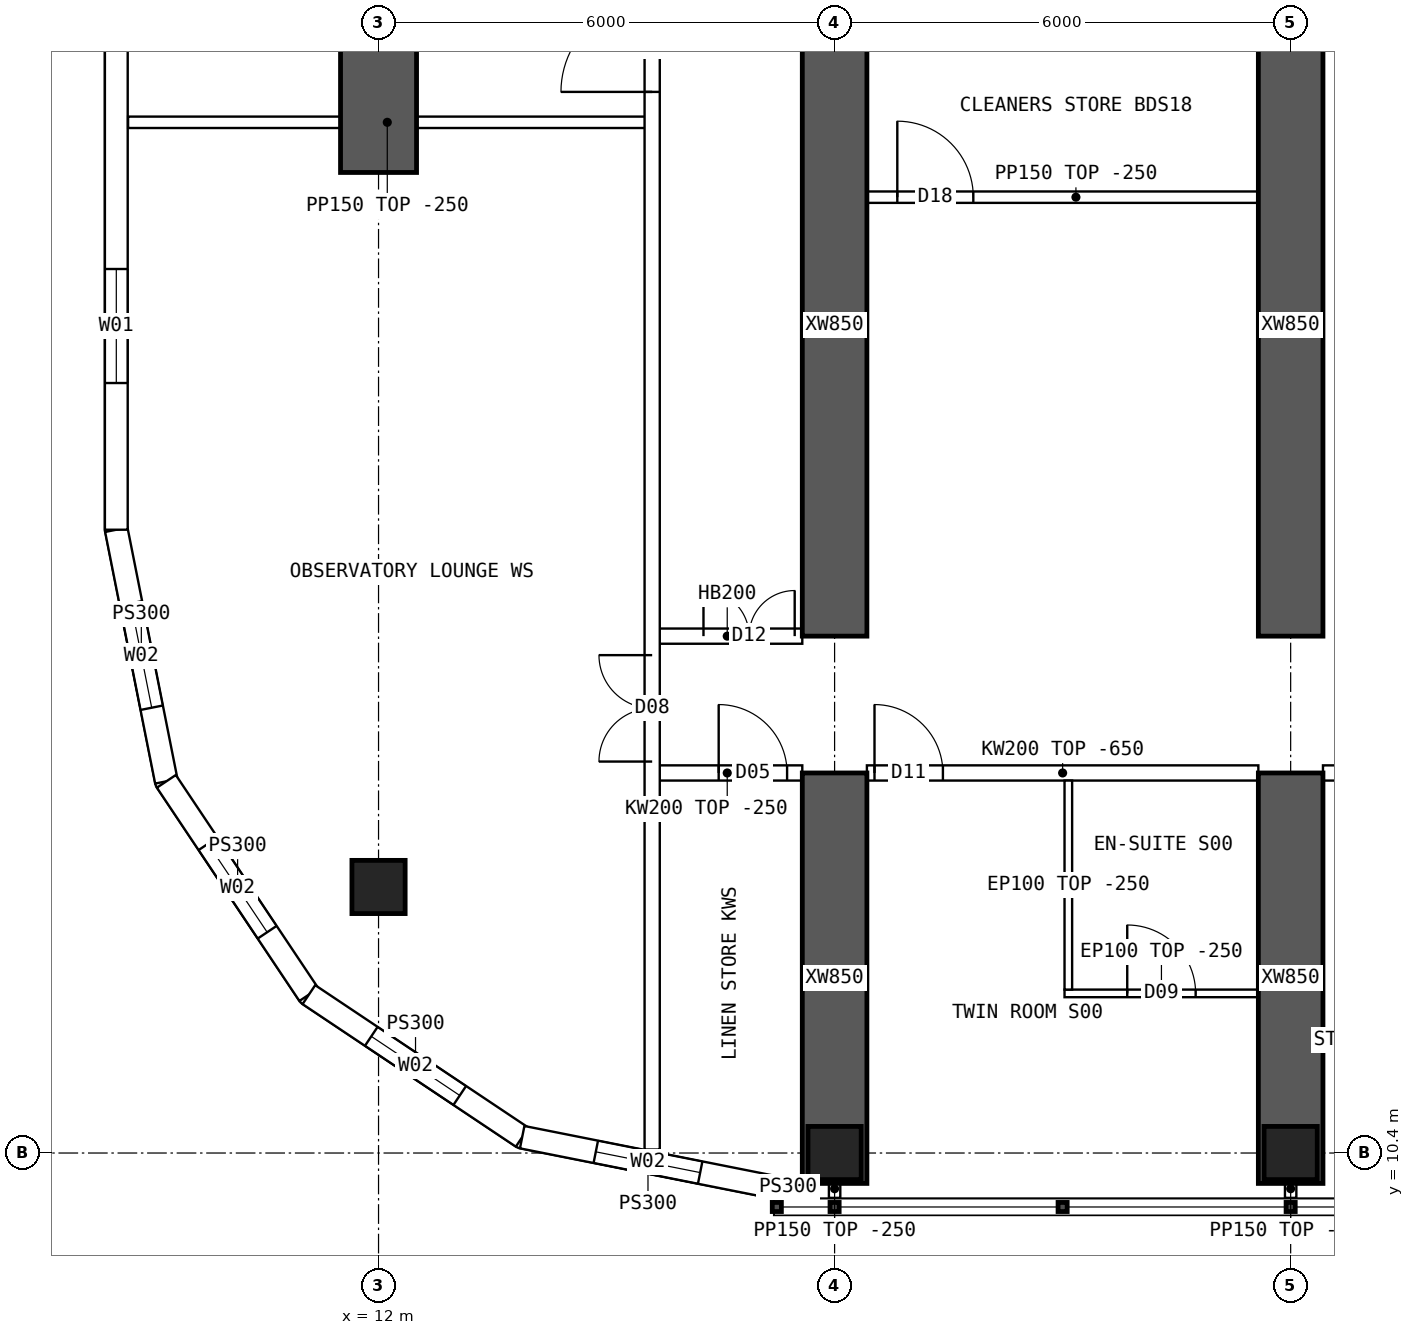
"""IFC4 building model, lengths in metres.
Left out: names, types, materials, properties, quantities, classifications, styles, units other than length and angle.
Written with IfcOpenShell. Run it as: python <this file> out.ifc"""

import sys

from ifc_helpers import new_model, si_unit, direction, frame, frame_2d, origin, origin_2d, place, context, subcontext, project, spatial, polyline, rectangle, hollow_rectangle, outline, extrude, element, fill, save


model = new_model("IFC4")
c1 = context("Model", 3, precision=1e-05, world=origin(), true_north=direction((0.0, 1.0)))
c2 = subcontext(c1, "Body", "Model", "MODEL_VIEW")
j1 = project(units=[si_unit("LENGTHUNIT", "METRE"), si_unit("PLANEANGLEUNIT", "RADIAN")], contexts=[c1])
p1 = place(None, origin())
s1 = spatial("IfcSite", under=j1, at=p1, CompositionType="ELEMENT")
p2 = place(p1, origin())
s2 = spatial("IfcBuilding", under=s1, at=p2, CompositionType="ELEMENT")
p3 = place(p2, frame((0.0, 0.0, 171.1)))
s3 = spatial("IfcBuildingStorey", under=s2, at=p3, CompositionType="ELEMENT", Elevation=171.1)
for number, where, z_axis, x_axis in (
    (1, (18.0, 10.4, 0.0), (0.0, 0.0, 1.0), (1.0, 0.0, 0.0)),
    (2, (24.0, 10.4, 0.0), (0.0, 0.0, 1.0), (1.0, 0.0, 0.0)),
    (3, (12.0, 13.9, 0.0), (0.0, 0.0, 1.0), (1.0, 0.0, 0.0)),
):
    element("IfcColumn", number, at=place(p3, frame(where, z_axis=z_axis, x_axis=x_axis)), inside=s3, PredefinedType="COLUMN", context=c2, shape_type="SweptSolid", body=[
        extrude(hollow_rectangle(XDim=0.7, YDim=0.7, WallThickness=0.07, at=origin_2d()), origin(), (0.0, 0.0, 1.0), 3.75),
    ])
p4 = place(p3, frame((12.0, 23.3, 0.0), z_axis=(0.0, 0.0, 1.0), x_axis=(0.0, 1.0, 0.0)))
e4 = element("IfcWall", 4, at=p4, inside=s3, PredefinedType="SHEAR", context=c2, shape_type="SweptSolid", body=[
    extrude(rectangle(XDim=5.0, YDim=1.0, at=frame_2d((2.5, 0.0))), origin(), (0.0, 0.0, 1.0), 3.75),
])
p5 = place(p3, frame((18.0, 10.0, 0.0), z_axis=(0.0, 0.0, 1.0), x_axis=(0.0, 1.0, 0.0)))
e5 = element("IfcWall", 5, at=p5, inside=s3, PredefinedType="SHEAR", context=c2, shape_type="SweptSolid", body=[
    extrude(rectangle(XDim=5.4, YDim=0.85, at=frame_2d((2.7, 0.0))), origin(), (0.0, 0.0, 1.0), 3.75),
])
p6 = place(p3, frame((18.0, 17.2, 0.0), z_axis=(0.0, 0.0, 1.0), x_axis=(0.0, 1.0, 0.0)))
e6 = element("IfcWall", 6, at=p6, inside=s3, PredefinedType="SHEAR", context=c2, shape_type="SweptSolid", body=[
    extrude(rectangle(XDim=8.175, YDim=0.85, at=frame_2d((4.087, 0.0))), origin(), (0.0, 0.0, 1.0), 3.75),
])
p7 = place(p3, frame((24.0, 10.0, 0.0), z_axis=(0.0, 0.0, 1.0), x_axis=(0.0, 1.0, 0.0)))
e7 = element("IfcWall", 7, at=p7, inside=s3, PredefinedType="SHEAR", context=c2, shape_type="SweptSolid", body=[
    extrude(rectangle(XDim=5.4, YDim=0.85, at=frame_2d((2.7, 0.0))), origin(), (0.0, 0.0, 1.0), 3.75),
])
p8 = place(p3, frame((24.0, 17.2, 0.0), z_axis=(0.0, 0.0, 1.0), x_axis=(0.0, 1.0, 0.0)))
e8 = element("IfcWall", 8, at=p8, inside=s3, PredefinedType="SHEAR", context=c2, shape_type="SweptSolid", body=[
    extrude(rectangle(XDim=8.175, YDim=0.85, at=frame_2d((4.087, 0.0))), origin(), (0.0, 0.0, 1.0), 3.75),
])
p9 = place(p3, frame((8.55, 45.4, 0.0), z_axis=(0.0, 0.0, 1.0), x_axis=(0.0, -1.0, 0.0)))
e9 = element("IfcWall", 9, at=p9, inside=s3, PredefinedType="SOLIDWALL", context=c2, shape_type="SweptSolid", body=[
    extrude(outline(polyline([(-0.015, -0.15), (26.815, -0.15), (26.785, 0.15), (0.015, 0.15), (-0.015, -0.15)])), origin(), (0.0, 0.0, 1.0), 3.5),
])
p10 = place(p9, frame((1.93, 0.0, 0.9)))
e10 = element("IfcOpeningElement", 10, at=p10, cuts=e9, PredefinedType="OPENING", context=c2, shape_type="SweptSolid", body=[
    extrude(rectangle(XDim=1.5, YDim=2.0, at=frame_2d((0.75, 1.0))), frame((0.0, 0.16, 0.0), z_axis=(0.0, -1.0, 0.0), x_axis=(1.0, 0.0, 0.0)), (0.0, 0.0, 1.0), 0.32),
])
p11 = place(p9, frame((7.29, 0.0, 0.9)))
e11 = element("IfcOpeningElement", 11, at=p11, cuts=e9, PredefinedType="OPENING", context=c2, shape_type="SweptSolid", body=[
    extrude(rectangle(XDim=1.5, YDim=2.0, at=frame_2d((0.75, 1.0))), frame((0.0, 0.16, 0.0), z_axis=(0.0, -1.0, 0.0), x_axis=(1.0, 0.0, 0.0)), (0.0, 0.0, 1.0), 0.32),
])
p12 = place(p9, frame((12.65, 0.0, 0.9)))
e12 = element("IfcOpeningElement", 12, at=p12, cuts=e9, PredefinedType="OPENING", context=c2, shape_type="SweptSolid", body=[
    extrude(rectangle(XDim=1.5, YDim=2.0, at=frame_2d((0.75, 1.0))), frame((0.0, 0.16, 0.0), z_axis=(0.0, -1.0, 0.0), x_axis=(1.0, 0.0, 0.0)), (0.0, 0.0, 1.0), 0.32),
])
p13 = place(p9, frame((18.01, 0.0, 0.9)))
e13 = element("IfcOpeningElement", 13, at=p13, cuts=e9, PredefinedType="OPENING", context=c2, shape_type="SweptSolid", body=[
    extrude(rectangle(XDim=1.5, YDim=2.0, at=frame_2d((0.75, 1.0))), frame((0.0, 0.16, 0.0), z_axis=(0.0, -1.0, 0.0), x_axis=(1.0, 0.0, 0.0)), (0.0, 0.0, 1.0), 0.32),
])
p14 = place(p9, frame((23.37, 0.0, 0.9)))
e14 = element("IfcOpeningElement", 14, at=p14, cuts=e9, PredefinedType="OPENING", context=c2, shape_type="SweptSolid", body=[
    extrude(rectangle(XDim=1.5, YDim=2.0, at=frame_2d((0.75, 1.0))), frame((0.0, 0.16, 0.0), z_axis=(0.0, -1.0, 0.0), x_axis=(1.0, 0.0, 0.0)), (0.0, 0.0, 1.0), 0.32),
])
p15 = place(p3, frame((8.55, 18.6, 0.0), z_axis=(0.0, 0.0, 1.0), x_axis=(0.19508664885, -0.980786011034, 0.0)))
e15 = element("IfcWall", 15, at=p15, inside=s3, PredefinedType="SOLIDWALL", context=c2, shape_type="SweptSolid", body=[
    extrude(outline(polyline([(-0.015, -0.15), (3.405, -0.15), (3.345, 0.15), (0.015, 0.15), (-0.015, -0.15)])), origin(), (0.0, 0.0, 1.0), 3.5),
])
p16 = place(p15, frame((0.988, 0.0, 0.9)))
e16 = element("IfcOpeningElement", 16, at=p16, cuts=e15, PredefinedType="OPENING", context=c2, shape_type="SweptSolid", body=[
    extrude(rectangle(XDim=1.4, YDim=1.8, at=frame_2d((0.7, 0.9))), frame((0.0, 0.16, 0.0), z_axis=(0.0, -1.0, 0.0), x_axis=(1.0, 0.0, 0.0)), (0.0, 0.0, 1.0), 0.32),
])
p17 = place(p3, frame((9.208, 15.29, 0.0), z_axis=(0.0, 0.0, 1.0), x_axis=(0.555534554399, -0.831493450887, 0.0)))
e17 = element("IfcWall", 17, at=p17, inside=s3, PredefinedType="SOLIDWALL", context=c2, shape_type="SweptSolid", body=[
    extrude(outline(polyline([(-0.03, -0.15), (3.405, -0.15), (3.345, 0.15), (0.03, 0.15), (-0.03, -0.15)])), origin(), (0.0, 0.0, 1.0), 3.5),
])
p18 = place(p17, frame((0.988, 0.0, 0.9)))
e18 = element("IfcOpeningElement", 18, at=p18, cuts=e17, PredefinedType="OPENING", context=c2, shape_type="SweptSolid", body=[
    extrude(rectangle(XDim=1.4, YDim=1.8, at=frame_2d((0.7, 0.9))), frame((0.0, 0.16, 0.0), z_axis=(0.0, -1.0, 0.0), x_axis=(1.0, 0.0, 0.0)), (0.0, 0.0, 1.0), 0.32),
])
p19 = place(p3, frame((11.083, 12.483, 0.0), z_axis=(0.0, 0.0, 1.0), x_axis=(0.831493450887, -0.555534554399, 0.0)))
e19 = element("IfcWall", 19, at=p19, inside=s3, PredefinedType="SOLIDWALL", context=c2, shape_type="SweptSolid", body=[
    extrude(outline(polyline([(-0.03, -0.15), (3.405, -0.15), (3.345, 0.15), (0.03, 0.15), (-0.03, -0.15)])), origin(), (0.0, 0.0, 1.0), 3.5),
])
p20 = place(p19, frame((0.988, 0.0, 0.9)))
e20 = element("IfcOpeningElement", 20, at=p20, cuts=e19, PredefinedType="OPENING", context=c2, shape_type="SweptSolid", body=[
    extrude(rectangle(XDim=1.4, YDim=1.8, at=frame_2d((0.7, 0.9))), frame((0.0, 0.16, 0.0), z_axis=(0.0, -1.0, 0.0), x_axis=(1.0, 0.0, 0.0)), (0.0, 0.0, 1.0), 0.32),
])
p21 = place(p3, frame((13.89, 10.608, 0.0), z_axis=(0.0, 0.0, 1.0), x_axis=(0.98078325777, -0.195100490205, 0.0)))
e21 = element("IfcWall", 21, at=p21, inside=s3, PredefinedType="SOLIDWALL", context=c2, shape_type="SweptSolid", body=[
    extrude(outline(polyline([(-0.03, -0.15), (3.405, -0.15), (3.345, 0.15), (0.03, 0.15), (-0.03, -0.15)])), origin(), (0.0, 0.0, 1.0), 3.5),
])
p22 = place(p21, frame((0.988, 0.0, 0.9)))
e22 = element("IfcOpeningElement", 22, at=p22, cuts=e21, PredefinedType="OPENING", context=c2, shape_type="SweptSolid", body=[
    extrude(rectangle(XDim=1.4, YDim=1.8, at=frame_2d((0.7, 0.9))), frame((0.0, 0.16, 0.0), z_axis=(0.0, -1.0, 0.0), x_axis=(1.0, 0.0, 0.0)), (0.0, 0.0, 1.0), 0.32),
])
p23 = place(p3, frame((17.2, 9.95, 0.0), z_axis=(0.0, 0.0, 1.0), x_axis=(1.0, 0.0, 0.0)))
e23 = element("IfcWall", 23, at=p23, inside=s3, PredefinedType="SOLIDWALL", context=c2, shape_type="SweptSolid", body=[
    extrude(rectangle(XDim=0.375, YDim=0.3, at=frame_2d((0.188, 0.0))), origin(), (0.0, 0.0, 1.0), 3.5),
])
p24 = place(p3, frame((15.6, 15.4, 0.0), z_axis=(0.0, 0.0, 1.0), x_axis=(1.0, 0.0, 0.0)))
e24 = element("IfcWall", 24, at=p24, inside=s3, PredefinedType="SOLIDWALL", context=c2, shape_type="SweptSolid", body=[
    extrude(rectangle(XDim=1.975, YDim=0.2, at=frame_2d((0.987, 0.0))), origin(), (0.0, 0.0, 1.0), 3.5),
])
p25 = place(p24, frame((0.875, 0.0, 0.0)))
e25 = element("IfcOpeningElement", 25, at=p25, cuts=e24, PredefinedType="OPENING", context=c2, shape_type="SweptSolid", body=[
    extrude(rectangle(XDim=0.9, YDim=2.1, at=frame_2d((0.45, 1.05))), frame((0.0, 0.11, 0.0), z_axis=(0.0, -1.0, 0.0), x_axis=(1.0, 0.0, 0.0)), (0.0, 0.0, 1.0), 0.22),
])
p26 = place(p3, frame((15.6, 17.2, 0.0), z_axis=(0.0, 0.0, 1.0), x_axis=(1.0, 0.0, 0.0)))
e26 = element("IfcWall", 26, at=p26, inside=s3, PredefinedType="SOLIDWALL", context=c2, shape_type="SweptSolid", body=[
    extrude(rectangle(XDim=1.975, YDim=0.2, at=frame_2d((0.987, 0.0))), origin(), (0.0, 0.0, 1.0), 3.5),
])
p27 = place(p26, frame((0.675, 0.0, 0.0)))
e27 = element("IfcOpeningElement", 27, at=p27, cuts=e26, PredefinedType="OPENING", context=c2, shape_type="SweptSolid", body=[
    extrude(rectangle(XDim=1.2, YDim=2.1, at=frame_2d((0.6, 1.05))), frame((0.0, 0.11, 0.0), z_axis=(0.0, -1.0, 0.0), x_axis=(1.0, 0.0, 0.0)), (0.0, 0.0, 1.0), 0.22),
])
p28 = place(p3, frame((18.425, 15.4, 0.0), z_axis=(0.0, 0.0, 1.0), x_axis=(1.0, 0.0, 0.0)))
e28 = element("IfcWall", 28, at=p28, inside=s3, PredefinedType="SOLIDWALL", context=c2, shape_type="SweptSolid", body=[
    extrude(outline(polyline([(0.0, 0.0), (5.15, 0.0), (5.15, 3.1), (0.0, 3.1), (0.0, 0.0)])), frame((0.0, 0.1, 0.0), z_axis=(0.0, -1.0, 0.0), x_axis=(1.0, 0.0, 0.0)), (0.0, 0.0, 1.0), 0.2),
])
p29 = place(p28, frame((0.1, 0.0, 0.0)))
e29 = element("IfcOpeningElement", 29, at=p29, cuts=e28, PredefinedType="OPENING", context=c2, shape_type="SweptSolid", body=[
    extrude(rectangle(XDim=0.9, YDim=2.1, at=frame_2d((0.45, 1.05))), frame((0.0, 0.11, 0.0), z_axis=(0.0, -1.0, 0.0), x_axis=(1.0, 0.0, 0.0)), (0.0, 0.0, 1.0), 0.22),
])
p30 = place(p3, frame((24.425, 15.4, 0.0), z_axis=(0.0, 0.0, 1.0), x_axis=(1.0, 0.0, 0.0)))
e30 = element("IfcWall", 30, at=p30, inside=s3, PredefinedType="SOLIDWALL", context=c2, shape_type="SweptSolid", body=[
    extrude(outline(polyline([(0.0, 0.0), (5.15, 0.0), (5.15, 3.1), (0.0, 3.1), (0.0, 0.0)])), frame((0.0, 0.1, 0.0), z_axis=(0.0, -1.0, 0.0), x_axis=(1.0, 0.0, 0.0)), (0.0, 0.0, 1.0), 0.2),
])
p31 = place(p30, frame((2.3, 0.0, 0.0)))
e31 = element("IfcOpeningElement", 31, at=p31, cuts=e30, PredefinedType="OPENING", context=c2, shape_type="SweptSolid", body=[
    extrude(rectangle(XDim=0.9, YDim=2.1, at=frame_2d((0.45, 1.05))), frame((0.0, 0.11, 0.0), z_axis=(0.0, -1.0, 0.0), x_axis=(1.0, 0.0, 0.0)), (0.0, 0.0, 1.0), 0.22),
])
p32 = place(p3, frame((23.575, 12.5, 0.0), z_axis=(0.0, 0.0, 1.0), x_axis=(-1.0, 0.0, 0.0)))
e32 = element("IfcWall", 32, at=p32, inside=s3, PredefinedType="PARTITIONING", context=c2, shape_type="SweptSolid", body=[
    extrude(rectangle(XDim=2.55, YDim=0.1, at=frame_2d((1.275, 0.0))), origin(), (0.0, 0.0, 1.0), 3.5),
])
p33 = place(p32, frame((0.825, 0.0, 0.0)))
e33 = element("IfcOpeningElement", 33, at=p33, cuts=e32, PredefinedType="OPENING", context=c2, shape_type="SweptSolid", body=[
    extrude(rectangle(XDim=0.9, YDim=2.1, at=frame_2d((0.45, 1.05))), frame((0.0, 0.06, 0.0), z_axis=(0.0, -1.0, 0.0), x_axis=(1.0, 0.0, 0.0)), (0.0, 0.0, 1.0), 0.12),
])
p34 = place(p3, frame((21.075, 12.55, 0.0), z_axis=(0.0, 0.0, 1.0), x_axis=(0.0, 1.0, 0.0)))
e34 = element("IfcWall", 34, at=p34, inside=s3, PredefinedType="PARTITIONING", context=c2, shape_type="SweptSolid", body=[
    extrude(outline(polyline([(0.0, 0.0), (2.75, 0.0), (2.75, 3.1), (2.702, 3.1), (2.7, 3.5), (0.0, 3.5), (0.0, 0.0)])), frame((0.0, 0.05, 0.0), z_axis=(0.0, -1.0, 0.0), x_axis=(1.0, 0.0, 0.0)), (0.0, 0.0, 1.0), 0.1),
])
p35 = place(p3, frame((18.425, 22.975, 0.0), z_axis=(0.0, 0.0, 1.0), x_axis=(1.0, 0.0, 0.0)))
e35 = element("IfcWall", 35, at=p35, inside=s3, PredefinedType="PARTITIONING", context=c2, shape_type="SweptSolid", body=[
    extrude(rectangle(XDim=5.5, YDim=0.15, at=frame_2d((2.75, 0.0))), origin(), (0.0, 0.0, 1.0), 3.5),
])
p36 = place(p35, frame((0.4, 0.0, 0.0)))
e36 = element("IfcOpeningElement", 36, at=p36, cuts=e35, PredefinedType="OPENING", context=c2, shape_type="SweptSolid", body=[
    extrude(rectangle(XDim=1.0, YDim=2.1, at=frame_2d((0.5, 1.05))), frame((0.0, 0.085, 0.0), z_axis=(0.0, -1.0, 0.0), x_axis=(1.0, 0.0, 0.0)), (0.0, 0.0, 1.0), 0.17),
])
p37 = place(p3, frame((15.6, 10.446, 0.0), z_axis=(0.0, 0.0, 1.0), x_axis=(0.0, 1.0, 0.0)))
e37 = element("IfcWall", 37, at=p37, inside=s3, PredefinedType="SOLIDWALL", context=c2, shape_type="SweptSolid", body=[
    extrude(rectangle(XDim=43.107, YDim=0.2, at=frame_2d((21.554, 0.0))), origin(), (0.0, 0.0, 1.0), 3.5),
])
p38 = place(p37, frame((13.914, 0.0, 0.0)))
e38 = element("IfcOpeningElement", 38, at=p38, cuts=e37, PredefinedType="OPENING", context=c2, shape_type="SweptSolid", body=[
    extrude(rectangle(XDim=1.2, YDim=2.1, at=frame_2d((0.6, 1.05))), frame((0.0, 0.11, 0.0), z_axis=(0.0, -1.0, 0.0), x_axis=(1.0, 0.0, 0.0)), (0.0, 0.0, 1.0), 0.22),
])
p39 = place(p37, frame((27.994, 0.0, 0.0)))
e39 = element("IfcOpeningElement", 39, at=p39, cuts=e37, PredefinedType="OPENING", context=c2, shape_type="SweptSolid", body=[
    extrude(rectangle(XDim=1.2, YDim=2.1, at=frame_2d((0.6, 1.05))), frame((0.0, 0.11, 0.0), z_axis=(0.0, -1.0, 0.0), x_axis=(1.0, 0.0, 0.0)), (0.0, 0.0, 1.0), 0.22),
])
p40 = place(p37, frame((5.104, 0.0, 0.0)))
e40 = element("IfcOpeningElement", 40, at=p40, cuts=e37, PredefinedType="OPENING", context=c2, shape_type="SweptSolid", body=[
    extrude(rectangle(XDim=1.4, YDim=2.1, at=frame_2d((0.7, 1.05))), frame((0.0, 0.11, 0.0), z_axis=(0.0, -1.0, 0.0), x_axis=(1.0, 0.0, 0.0)), (0.0, 0.0, 1.0), 0.22),
])
p41 = place(p37, frame((36.504, 0.0, 0.0)))
e41 = element("IfcOpeningElement", 41, at=p41, cuts=e37, PredefinedType="OPENING", context=c2, shape_type="SweptSolid", body=[
    extrude(rectangle(XDim=1.4, YDim=2.1, at=frame_2d((0.7, 1.05))), frame((0.0, 0.11, 0.0), z_axis=(0.0, -1.0, 0.0), x_axis=(1.0, 0.0, 0.0)), (0.0, 0.0, 1.0), 0.22),
])
p42 = place(p3, frame((8.705, 23.96, 0.0), z_axis=(0.0, 0.0, 1.0), x_axis=(1.0, 0.0, 0.0)))
e42 = element("IfcWall", 42, at=p42, inside=s3, PredefinedType="PARTITIONING", context=c2, shape_type="SweptSolid", body=[
    extrude(rectangle(XDim=6.82, YDim=0.15, at=frame_2d((3.41, 0.0))), origin(), (0.0, 0.0, 1.0), 3.5),
])
for number, where, z_axis, x_axis in (
    (43, (18.0, 10.05, 0.0), (0.0, 0.0, 1.0), (0.0, -1.0, 0.0)),
    (44, (24.0, 10.05, 0.0), (0.0, 0.0, 1.0), (0.0, -1.0, 0.0)),
):
    element("IfcWall", number, at=place(p3, frame(where, z_axis=z_axis, x_axis=x_axis)), inside=s3, PredefinedType="PARTITIONING", context=c2, shape_type="SweptSolid", body=[
        extrude(rectangle(XDim=0.24, YDim=0.15, at=frame_2d((0.12, 0.0))), origin(), (0.0, 0.0, 1.0), 3.5),
    ])
p43 = place(p14, origin())
e45 = element("IfcWindow", 45, at=p43, inside=s3, PartitioningType="SINGLE_PANEL", PredefinedType="WINDOW", context=c2, shape_type="SweptSolid", body=[
    extrude(rectangle(XDim=1.5, YDim=2.0, at=frame_2d((0.75, 1.0))), frame((0.0, 0.03, 0.0), z_axis=(0.0, -1.0, 0.0), x_axis=(1.0, 0.0, 0.0)), (0.0, 0.0, 1.0), 0.06),
])
fill(e14, e45)
p44 = place(p16, origin())
e46 = element("IfcWindow", 46, at=p44, inside=s3, PartitioningType="SINGLE_PANEL", PredefinedType="WINDOW", context=c2, shape_type="SweptSolid", body=[
    extrude(rectangle(XDim=1.4, YDim=1.8, at=frame_2d((0.7, 0.9))), frame((0.0, 0.03, 0.0), z_axis=(0.0, -1.0, 0.0), x_axis=(1.0, 0.0, 0.0)), (0.0, 0.0, 1.0), 0.06),
])
fill(e16, e46)
p45 = place(p18, origin())
e47 = element("IfcWindow", 47, at=p45, inside=s3, PartitioningType="SINGLE_PANEL", PredefinedType="WINDOW", context=c2, shape_type="SweptSolid", body=[
    extrude(rectangle(XDim=1.4, YDim=1.8, at=frame_2d((0.7, 0.9))), frame((0.0, 0.03, 0.0), z_axis=(0.0, -1.0, 0.0), x_axis=(1.0, 0.0, 0.0)), (0.0, 0.0, 1.0), 0.06),
])
fill(e18, e47)
p46 = place(p20, origin())
e48 = element("IfcWindow", 48, at=p46, inside=s3, PartitioningType="SINGLE_PANEL", PredefinedType="WINDOW", context=c2, shape_type="SweptSolid", body=[
    extrude(rectangle(XDim=1.4, YDim=1.8, at=frame_2d((0.7, 0.9))), frame((0.0, 0.03, 0.0), z_axis=(0.0, -1.0, 0.0), x_axis=(1.0, 0.0, 0.0)), (0.0, 0.0, 1.0), 0.06),
])
fill(e20, e48)
p47 = place(p22, origin())
e49 = element("IfcWindow", 49, at=p47, inside=s3, PartitioningType="SINGLE_PANEL", PredefinedType="WINDOW", context=c2, shape_type="SweptSolid", body=[
    extrude(rectangle(XDim=1.4, YDim=1.8, at=frame_2d((0.7, 0.9))), frame((0.0, 0.03, 0.0), z_axis=(0.0, -1.0, 0.0), x_axis=(1.0, 0.0, 0.0)), (0.0, 0.0, 1.0), 0.06),
])
fill(e22, e49)
p48 = place(p27, origin())
e50 = element("IfcDoor", 50, at=p48, inside=s3, OperationType="DOUBLE_DOOR_SINGLE_SWING", PredefinedType="DOOR", context=c2, shape_type="SweptSolid", body=[
    extrude(rectangle(XDim=1.2, YDim=2.1, at=frame_2d((0.6, 1.05))), frame((0.0, 0.025, 0.0), z_axis=(0.0, -1.0, 0.0), x_axis=(1.0, 0.0, 0.0)), (0.0, 0.0, 1.0), 0.05),
])
fill(e27, e50)
p49 = place(p33, origin())
e51 = element("IfcDoor", 51, at=p49, inside=s3, OperationType="SINGLE_SWING_RIGHT", PredefinedType="DOOR", context=c2, shape_type="SweptSolid", body=[
    extrude(rectangle(XDim=0.9, YDim=2.1, at=frame_2d((0.45, 1.05))), frame((0.0, 0.025, 0.0), z_axis=(0.0, -1.0, 0.0), x_axis=(1.0, 0.0, 0.0)), (0.0, 0.0, 1.0), 0.05),
])
fill(e33, e51)
p50 = place(p29, origin())
e52 = element("IfcDoor", 52, at=p50, inside=s3, OperationType="SINGLE_SWING_LEFT", PredefinedType="DOOR", context=c2, shape_type="SweptSolid", body=[
    extrude(rectangle(XDim=0.9, YDim=2.1, at=frame_2d((0.45, 1.05))), frame((0.0, 0.025, 0.0), z_axis=(0.0, -1.0, 0.0), x_axis=(1.0, 0.0, 0.0)), (0.0, 0.0, 1.0), 0.05),
])
fill(e29, e52)
p51 = place(p36, origin())
e53 = element("IfcDoor", 53, at=p51, inside=s3, OperationType="SINGLE_SWING_LEFT", PredefinedType="DOOR", context=c2, shape_type="SweptSolid", body=[
    extrude(rectangle(XDim=1.0, YDim=2.1, at=frame_2d((0.5, 1.05))), frame((0.0, 0.025, 0.0), z_axis=(0.0, -1.0, 0.0), x_axis=(1.0, 0.0, 0.0)), (0.0, 0.0, 1.0), 0.05),
])
fill(e36, e53)
p52 = place(p38, origin())
e54 = element("IfcDoor", 54, at=p52, inside=s3, OperationType="SINGLE_SWING_LEFT", PredefinedType="DOOR", context=c2, shape_type="SweptSolid", body=[
    extrude(rectangle(XDim=1.2, YDim=2.1, at=frame_2d((0.6, 1.05))), frame((0.0, 0.025, 0.0), z_axis=(0.0, -1.0, 0.0), x_axis=(1.0, 0.0, 0.0)), (0.0, 0.0, 1.0), 0.05),
])
fill(e38, e54)
p53 = place(p40, origin())
e55 = element("IfcDoor", 55, at=p53, inside=s3, OperationType="DOUBLE_DOOR_SINGLE_SWING", PredefinedType="DOOR", context=c2, shape_type="SweptSolid", body=[
    extrude(rectangle(XDim=1.4, YDim=2.1, at=frame_2d((0.7, 1.05))), frame((0.0, 0.025, 0.0), z_axis=(0.0, -1.0, 0.0), x_axis=(1.0, 0.0, 0.0)), (0.0, 0.0, 1.0), 0.05),
])
fill(e40, e55)
p54 = place(p25, origin())
e56 = element("IfcDoor", 56, at=p54, inside=s3, OperationType="SINGLE_SWING_LEFT", PredefinedType="DOOR", context=c2, shape_type="SweptSolid", body=[
    extrude(rectangle(XDim=0.9, YDim=2.1, at=frame_2d((0.45, 1.05))), frame((0.0, 0.025, 0.0), z_axis=(0.0, -1.0, 0.0), x_axis=(1.0, 0.0, 0.0)), (0.0, 0.0, 1.0), 0.05),
])
fill(e25, e56)
save(model, sys.argv[1])
